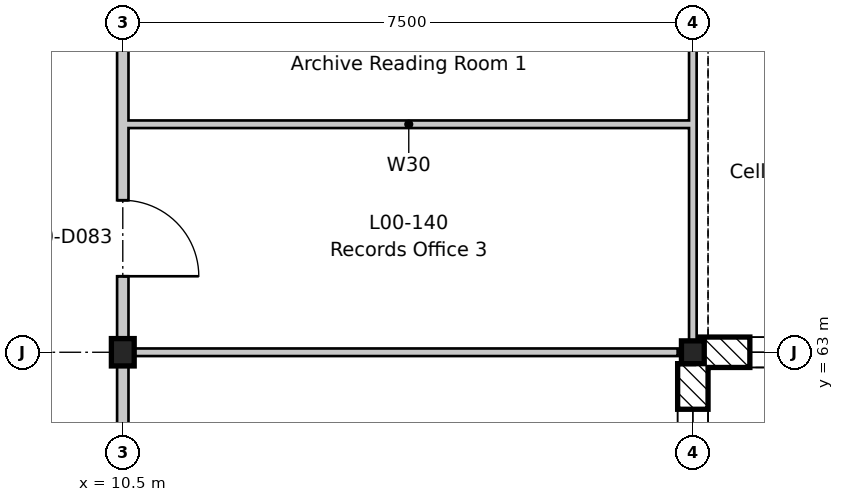
"""IFC4 building model, lengths in metres.
Left out: names, types, materials, properties, quantities, classifications, styles, units other than length and angle.
Written with IfcOpenShell. Run it as: python <this file> out.ifc"""

import sys

from ifc_helpers import new_model, si_unit, direction, frame, frame_2d, origin, origin_2d, place, context, subcontext, project, spatial, rectangle, i_section, extrude, element, fill, save


model = new_model("IFC4")
c1 = context("Model", 3, precision=1e-05, world=origin(), true_north=direction((0.0, 1.0)))
c2 = subcontext(c1, "Body", "Model", "MODEL_VIEW")
j1 = project(units=[si_unit("LENGTHUNIT", "METRE"), si_unit("PLANEANGLEUNIT", "RADIAN")], contexts=[c1])
p1 = place(None, origin())
s1 = spatial("IfcSite", under=j1, at=p1, CompositionType="ELEMENT")
p2 = place(p1, origin())
s2 = spatial("IfcBuilding", under=s1, at=p2, CompositionType="ELEMENT")
p3 = place(p2, origin())
s3 = spatial("IfcBuildingStorey", under=s2, at=p3, CompositionType="ELEMENT", Elevation=0.0)
p4 = place(p3, frame((10.5, 63.0, -0.6), z_axis=(0.0, 0.0, 1.0), x_axis=(1.0, 0.0, 0.0)))
e1 = element("IfcColumn", 1, at=p4, inside=s3, PredefinedType="COLUMN", context=c2, shape_type="SweptSolid", body=[
    extrude(i_section(OverallWidth=0.3, OverallDepth=0.36, WebThickness=0.012, FlangeThickness=0.022, FilletRadius=0.027, at=origin_2d()), origin(), (0.0, 0.0, 1.0), 5.8),
])
p5 = place(p3, frame((18.0, 63.0, -0.6), z_axis=(0.0, 0.0, 1.0), x_axis=(1.0, 0.0, 0.0)))
e2 = element("IfcColumn", 2, at=p5, inside=s3, PredefinedType="COLUMN", context=c2, shape_type="SweptSolid", body=[
    extrude(i_section(OverallWidth=0.3, OverallDepth=0.3, WebThickness=0.011, FlangeThickness=0.019, FilletRadius=0.027, at=origin_2d()), origin(), (0.0, 0.0, 1.0), 5.8),
])
p6 = place(p3, frame((18.0, 62.85, 0.0), z_axis=(0.0, 0.0, 1.0), x_axis=(0.0, -1.0, 0.0)))
e3 = element("IfcWall", 3, at=p6, inside=s3, PredefinedType="STANDARD", context=c2, shape_type="SweptSolid", body=[
    extrude(rectangle(XDim=8.7, YDim=0.4, at=frame_2d((4.35, 0.0))), origin(), (0.0, 0.0, 1.0), 4.8),
])
p7 = place(p6, frame((6.6, 0.0, 0.3)))
e4 = element("IfcOpeningElement", 4, at=p7, cuts=e3, PredefinedType="OPENING", context=c2, shape_type="SweptSolid", body=[
    extrude(rectangle(XDim=1.5, YDim=3.3, at=frame_2d((0.75, 1.65))), frame((0.0, 0.21, 0.0), z_axis=(0.0, -1.0, 0.0), x_axis=(1.0, 0.0, 0.0)), (0.0, 0.0, 1.0), 0.42),
])
p8 = place(p6, frame((3.6, 0.0, 0.3)))
e5 = element("IfcOpeningElement", 5, at=p8, cuts=e3, PredefinedType="OPENING", context=c2, shape_type="SweptSolid", body=[
    extrude(rectangle(XDim=1.5, YDim=3.3, at=frame_2d((0.75, 1.65))), frame((0.0, 0.21, 0.0), z_axis=(0.0, -1.0, 0.0), x_axis=(1.0, 0.0, 0.0)), (0.0, 0.0, 1.0), 0.42),
])
p9 = place(p6, frame((0.6, 0.0, 0.3)))
e6 = element("IfcOpeningElement", 6, at=p9, cuts=e3, PredefinedType="OPENING", context=c2, shape_type="SweptSolid", body=[
    extrude(rectangle(XDim=1.5, YDim=3.3, at=frame_2d((0.75, 1.65))), frame((0.0, 0.21, 0.0), z_axis=(0.0, -1.0, 0.0), x_axis=(1.0, 0.0, 0.0)), (0.0, 0.0, 1.0), 0.42),
])
p10 = place(p3, frame((26.99, 63.0, 0.0), z_axis=(0.0, 0.0, 1.0), x_axis=(-1.0, 0.0, 0.0)))
e7 = element("IfcWall", 7, at=p10, inside=s3, PredefinedType="STANDARD", context=c2, shape_type="SweptSolid", body=[
    extrude(rectangle(XDim=8.979, YDim=0.4, at=frame_2d((4.49, 0.0))), origin(), (0.0, 0.0, 1.0), 4.8),
])
p11 = place(p10, frame((6.74, 0.0, 0.3)))
e8 = element("IfcOpeningElement", 8, at=p11, cuts=e7, PredefinedType="OPENING", context=c2, shape_type="SweptSolid", body=[
    extrude(rectangle(XDim=1.5, YDim=3.3, at=frame_2d((0.75, 1.65))), frame((0.0, 0.21, 0.0), z_axis=(0.0, -1.0, 0.0), x_axis=(1.0, 0.0, 0.0)), (0.0, 0.0, 1.0), 0.42),
])
p12 = place(p10, frame((3.74, 0.0, 0.3)))
e9 = element("IfcOpeningElement", 9, at=p12, cuts=e7, PredefinedType="OPENING", context=c2, shape_type="SweptSolid", body=[
    extrude(rectangle(XDim=1.5, YDim=3.3, at=frame_2d((0.75, 1.65))), frame((0.0, 0.21, 0.0), z_axis=(0.0, -1.0, 0.0), x_axis=(1.0, 0.0, 0.0)), (0.0, 0.0, 1.0), 0.42),
])
p13 = place(p10, frame((0.74, 0.0, 0.3)))
e10 = element("IfcOpeningElement", 10, at=p13, cuts=e7, PredefinedType="OPENING", context=c2, shape_type="SweptSolid", body=[
    extrude(rectangle(XDim=1.5, YDim=3.3, at=frame_2d((0.75, 1.65))), frame((0.0, 0.21, 0.0), z_axis=(0.0, -1.0, 0.0), x_axis=(1.0, 0.0, 0.0)), (0.0, 0.0, 1.0), 0.42),
])
p14 = place(p3, frame((10.575, 63.0, 0.0), z_axis=(0.0, 0.0, 1.0), x_axis=(1.0, 0.0, 0.0)))
e11 = element("IfcWall", 11, at=p14, inside=s3, PredefinedType="PARTITIONING", context=c2, shape_type="SweptSolid", body=[
    extrude(rectangle(XDim=7.225, YDim=0.1, at=frame_2d((3.613, 0.0))), origin(), (0.0, 0.0, 1.0), 4.85),
])
p15 = place(p3, frame((10.5, 0.0, 0.0), z_axis=(0.0, 0.0, 1.0), x_axis=(0.0, 1.0, 0.0)))
e12 = element("IfcWall", 12, at=p15, inside=s3, PredefinedType="PARTITIONING", context=c2, shape_type="SweptSolid", body=[
    extrude(rectangle(XDim=70.5, YDim=0.15, at=frame_2d((35.25, 0.0))), origin(), (0.0, 0.0, 1.0), 4.68),
])
p16 = place(p15, frame((1.0, 0.0, 0.0)))
e13 = element("IfcOpeningElement", 13, at=p16, cuts=e12, PredefinedType="OPENING", context=c2, shape_type="SweptSolid", body=[
    extrude(rectangle(XDim=1.0, YDim=2.1, at=frame_2d((0.5, 1.05))), frame((0.0, 0.085, 0.0), z_axis=(0.0, -1.0, 0.0), x_axis=(1.0, 0.0, 0.0)), (0.0, 0.0, 1.0), 0.17),
])
p17 = place(p15, frame((5.5, 0.0, 0.0)))
e14 = element("IfcOpeningElement", 14, at=p17, cuts=e12, PredefinedType="OPENING", context=c2, shape_type="SweptSolid", body=[
    extrude(rectangle(XDim=1.0, YDim=2.1, at=frame_2d((0.5, 1.05))), frame((0.0, 0.085, 0.0), z_axis=(0.0, -1.0, 0.0), x_axis=(1.0, 0.0, 0.0)), (0.0, 0.0, 1.0), 0.17),
])
p18 = place(p15, frame((11.5, 0.0, 0.0)))
e15 = element("IfcOpeningElement", 15, at=p18, cuts=e12, PredefinedType="OPENING", context=c2, shape_type="SweptSolid", body=[
    extrude(rectangle(XDim=1.0, YDim=2.1, at=frame_2d((0.5, 1.05))), frame((0.0, 0.085, 0.0), z_axis=(0.0, -1.0, 0.0), x_axis=(1.0, 0.0, 0.0)), (0.0, 0.0, 1.0), 0.17),
])
p19 = place(p15, frame((18.8, 0.0, 0.0)))
e16 = element("IfcOpeningElement", 16, at=p19, cuts=e12, PredefinedType="OPENING", context=c2, shape_type="SweptSolid", body=[
    extrude(rectangle(XDim=1.4, YDim=2.1, at=frame_2d((0.7, 1.05))), frame((0.0, 0.085, 0.0), z_axis=(0.0, -1.0, 0.0), x_axis=(1.0, 0.0, 0.0)), (0.0, 0.0, 1.0), 0.17),
])
p20 = place(p15, frame((25.0, 0.0, 0.0)))
e17 = element("IfcOpeningElement", 17, at=p20, cuts=e12, PredefinedType="OPENING", context=c2, shape_type="SweptSolid", body=[
    extrude(rectangle(XDim=1.0, YDim=2.1, at=frame_2d((0.5, 1.05))), frame((0.0, 0.085, 0.0), z_axis=(0.0, -1.0, 0.0), x_axis=(1.0, 0.0, 0.0)), (0.0, 0.0, 1.0), 0.17),
])
p21 = place(p15, frame((28.0, 0.0, 0.0)))
e18 = element("IfcOpeningElement", 18, at=p21, cuts=e12, PredefinedType="OPENING", context=c2, shape_type="SweptSolid", body=[
    extrude(rectangle(XDim=1.0, YDim=2.1, at=frame_2d((0.5, 1.05))), frame((0.0, 0.085, 0.0), z_axis=(0.0, -1.0, 0.0), x_axis=(1.0, 0.0, 0.0)), (0.0, 0.0, 1.0), 0.17),
])
p22 = place(p15, frame((33.8, 0.0, 0.0)))
e19 = element("IfcOpeningElement", 19, at=p22, cuts=e12, PredefinedType="OPENING", context=c2, shape_type="SweptSolid", body=[
    extrude(rectangle(XDim=1.4, YDim=2.1, at=frame_2d((0.7, 1.05))), frame((0.0, 0.085, 0.0), z_axis=(0.0, -1.0, 0.0), x_axis=(1.0, 0.0, 0.0)), (0.0, 0.0, 1.0), 0.17),
])
p23 = place(p15, frame((41.5, 0.0, 0.0)))
e20 = element("IfcOpeningElement", 20, at=p23, cuts=e12, PredefinedType="OPENING", context=c2, shape_type="SweptSolid", body=[
    extrude(rectangle(XDim=1.0, YDim=2.1, at=frame_2d((0.5, 1.05))), frame((0.0, 0.085, 0.0), z_axis=(0.0, -1.0, 0.0), x_axis=(1.0, 0.0, 0.0)), (0.0, 0.0, 1.0), 0.17),
])
p24 = place(p15, frame((46.0, 0.0, 0.0)))
e21 = element("IfcOpeningElement", 21, at=p24, cuts=e12, PredefinedType="OPENING", context=c2, shape_type="SweptSolid", body=[
    extrude(rectangle(XDim=1.0, YDim=2.1, at=frame_2d((0.5, 1.05))), frame((0.0, 0.085, 0.0), z_axis=(0.0, -1.0, 0.0), x_axis=(1.0, 0.0, 0.0)), (0.0, 0.0, 1.0), 0.17),
])
p25 = place(p15, frame((49.0, 0.0, 0.0)))
e22 = element("IfcOpeningElement", 22, at=p25, cuts=e12, PredefinedType="OPENING", context=c2, shape_type="SweptSolid", body=[
    extrude(rectangle(XDim=1.0, YDim=2.1, at=frame_2d((0.5, 1.05))), frame((0.0, 0.085, 0.0), z_axis=(0.0, -1.0, 0.0), x_axis=(1.0, 0.0, 0.0)), (0.0, 0.0, 1.0), 0.17),
])
p26 = place(p15, frame((54.75, 0.0, 0.0)))
e23 = element("IfcOpeningElement", 23, at=p26, cuts=e12, PredefinedType="OPENING", context=c2, shape_type="SweptSolid", body=[
    extrude(rectangle(XDim=1.0, YDim=2.1, at=frame_2d((0.5, 1.05))), frame((0.0, 0.085, 0.0), z_axis=(0.0, -1.0, 0.0), x_axis=(1.0, 0.0, 0.0)), (0.0, 0.0, 1.0), 0.17),
])
p27 = place(p15, frame((58.0, 0.0, 0.0)))
e24 = element("IfcOpeningElement", 24, at=p27, cuts=e12, PredefinedType="OPENING", context=c2, shape_type="SweptSolid", body=[
    extrude(rectangle(XDim=1.0, YDim=2.1, at=frame_2d((0.5, 1.05))), frame((0.0, 0.085, 0.0), z_axis=(0.0, -1.0, 0.0), x_axis=(1.0, 0.0, 0.0)), (0.0, 0.0, 1.0), 0.17),
])
p28 = place(p15, frame((61.0, 0.0, 0.0)))
e25 = element("IfcOpeningElement", 25, at=p28, cuts=e12, PredefinedType="OPENING", context=c2, shape_type="SweptSolid", body=[
    extrude(rectangle(XDim=1.0, YDim=2.1, at=frame_2d((0.5, 1.05))), frame((0.0, 0.085, 0.0), z_axis=(0.0, -1.0, 0.0), x_axis=(1.0, 0.0, 0.0)), (0.0, 0.0, 1.0), 0.17),
])
p29 = place(p15, frame((64.0, 0.0, 0.0)))
e26 = element("IfcOpeningElement", 26, at=p29, cuts=e12, PredefinedType="OPENING", context=c2, shape_type="SweptSolid", body=[
    extrude(rectangle(XDim=1.0, YDim=2.1, at=frame_2d((0.5, 1.05))), frame((0.0, 0.085, 0.0), z_axis=(0.0, -1.0, 0.0), x_axis=(1.0, 0.0, 0.0)), (0.0, 0.0, 1.0), 0.17),
])
p30 = place(p3, frame((10.575, 66.0, 0.0), z_axis=(0.0, 0.0, 1.0), x_axis=(1.0, 0.0, 0.0)))
e27 = element("IfcWall", 27, at=p30, inside=s3, PredefinedType="PARTITIONING", context=c2, shape_type="SweptSolid", body=[
    extrude(rectangle(XDim=7.375, YDim=0.1, at=frame_2d((3.688, 0.0))), origin(), (0.0, 0.0, 1.0), 5.2),
])
p31 = place(p3, frame((18.0, 63.075, 0.0), z_axis=(0.0, 0.0, 1.0), x_axis=(0.0, 1.0, 0.0)))
e28 = element("IfcWall", 28, at=p31, inside=s3, PredefinedType="PARTITIONING", context=c2, shape_type="SweptSolid", body=[
    extrude(rectangle(XDim=7.35, YDim=0.1, at=frame_2d((3.675, 0.0))), origin(), (0.0, 0.0, 1.0), 4.78),
])
p32 = place(p9, origin())
e29 = element("IfcWindow", 29, at=p32, inside=s3, PartitioningType="SINGLE_PANEL", PredefinedType="WINDOW", context=c2, shape_type="SweptSolid", body=[
    extrude(rectangle(XDim=1.5, YDim=3.3, at=frame_2d((0.75, 1.65))), frame((0.0, -0.12, 0.0), z_axis=(0.0, -1.0, 0.0), x_axis=(1.0, 0.0, 0.0)), (0.0, 0.0, 1.0), 0.06),
])
fill(e6, e29)
p33 = place(p11, origin())
e30 = element("IfcWindow", 30, at=p33, inside=s3, PartitioningType="SINGLE_PANEL", PredefinedType="WINDOW", context=c2, shape_type="SweptSolid", body=[
    extrude(rectangle(XDim=1.5, YDim=3.3, at=frame_2d((0.75, 1.65))), frame((0.0, -0.12, 0.0), z_axis=(0.0, -1.0, 0.0), x_axis=(1.0, 0.0, 0.0)), (0.0, 0.0, 1.0), 0.06),
])
fill(e8, e30)
p34 = place(p29, frame((1.0, 0.0, 0.0), z_axis=(0.0, 0.0, 1.0), x_axis=(-1.0, 0.0, 0.0)))
e31 = element("IfcDoor", 31, at=p34, inside=s3, OperationType="SINGLE_SWING_RIGHT", PredefinedType="DOOR", context=c2, shape_type="SweptSolid", body=[
    extrude(rectangle(XDim=1.0, YDim=2.1, at=frame_2d((0.5, 1.05))), frame((0.0, 0.025, 0.0), z_axis=(0.0, -1.0, 0.0), x_axis=(1.0, 0.0, 0.0)), (0.0, 0.0, 1.0), 0.05),
])
fill(e26, e31)
save(model, sys.argv[1])
